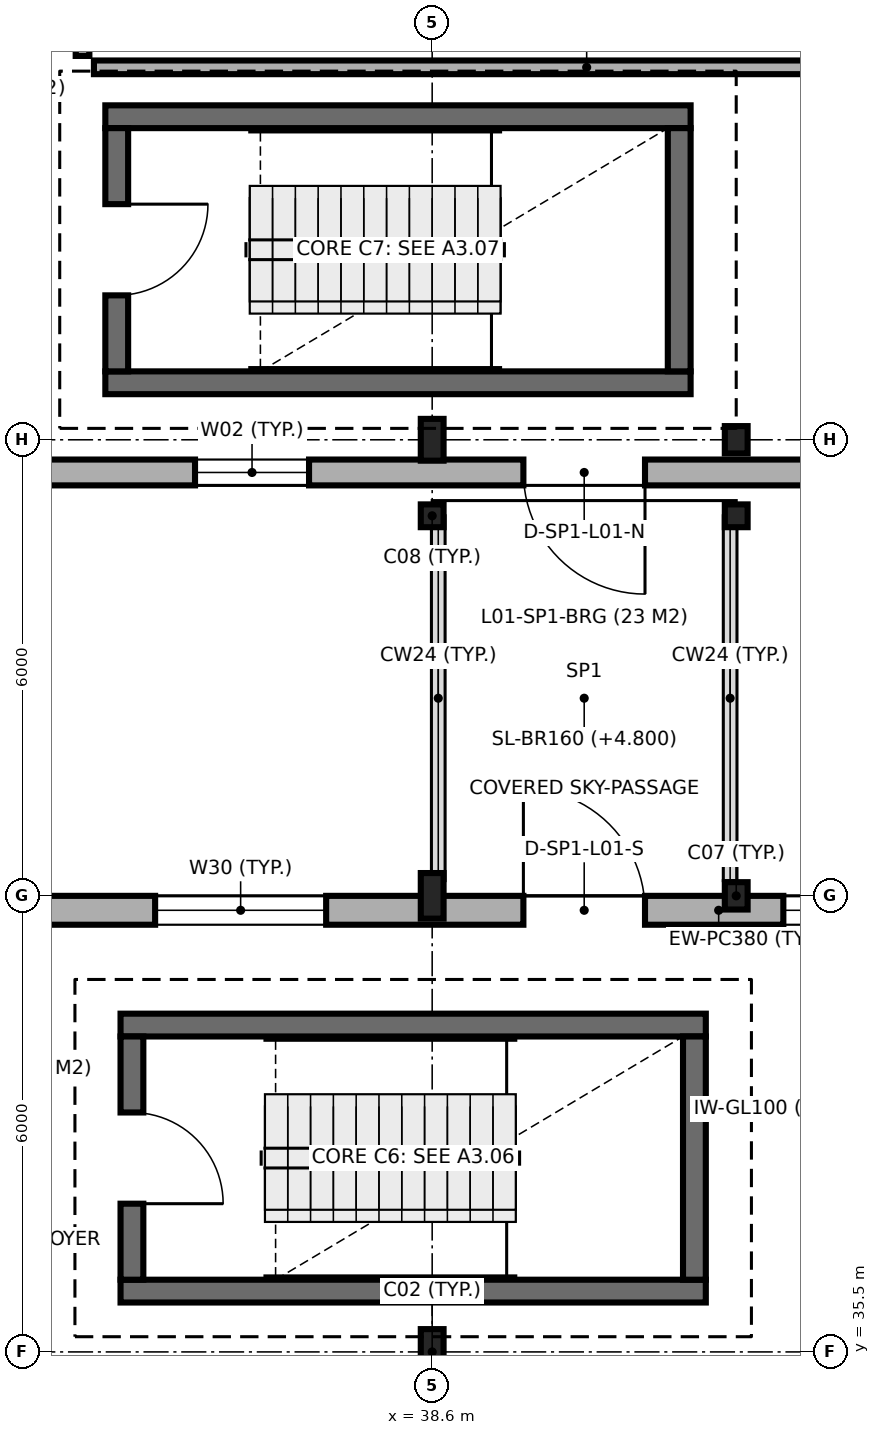
"""IFC4 building model, lengths in metres.
Left out: names, types, materials, properties, quantities, classifications, styles, units other than length and angle.
Written with IfcOpenShell. Run it as: python <this file> out.ifc"""

import sys

from ifc_helpers import new_model, si_unit, direction, frame, frame_2d, origin, origin_2d, place, context, subcontext, project, spatial, rectangle, i_section, extrude, element, fill, save


model = new_model("IFC4")
c1 = context("Model", 3, precision=1e-05, world=origin(), true_north=direction((0.0, 1.0)))
c2 = subcontext(c1, "Body", "Model", "MODEL_VIEW")
j1 = project(units=[si_unit("LENGTHUNIT", "METRE"), si_unit("PLANEANGLEUNIT", "RADIAN")], contexts=[c1])
p1 = place(None, origin())
s1 = spatial("IfcSite", under=j1, at=p1, CompositionType="ELEMENT")
p2 = place(p1, origin())
s2 = spatial("IfcBuilding", under=s1, at=p2, CompositionType="ELEMENT")
p3 = place(p2, frame((0.0, 0.0, 4.8)))
s3 = spatial("IfcBuildingStorey", under=s2, at=p3, CompositionType="ELEMENT", Elevation=4.8)
for number, where, z_axis, x_axis in (
    (1, (38.6, 35.5, 0.0), (0.0, 0.0, 1.0), (1.0, 0.0, 0.0)),
    (2, (38.6, 41.5, 0.0), (0.0, 0.0, 1.0), (1.0, 0.0, 0.0)),
):
    element("IfcColumn", number, at=place(p3, frame(where, z_axis=z_axis, x_axis=x_axis)), inside=s3, PredefinedType="COLUMN", context=c2, shape_type="SweptSolid", body=[
        extrude(i_section(OverallWidth=0.3, OverallDepth=0.6, WebThickness=0.015, FlangeThickness=0.03, FilletRadius=0.027, at=origin_2d()), origin(), (0.0, 0.0, 1.0), 4.5),
    ])
p4 = place(p3, frame((38.6, 46.5, 0.0), z_axis=(0.0, 0.0, 1.0), x_axis=(1.0, 0.0, 0.0)))
e3 = element("IfcColumn", 3, at=p4, inside=s3, PredefinedType="COLUMN", context=c2, shape_type="SweptSolid", body=[
    extrude(i_section(OverallWidth=0.3, OverallDepth=0.3, WebThickness=0.011, FlangeThickness=0.019, FilletRadius=0.027, at=origin_2d()), origin(), (0.0, 0.0, 1.0), 4.5),
])
p5 = place(p3, frame((38.6, 47.5, 0.0), z_axis=(0.0, 0.0, 1.0), x_axis=(1.0, 0.0, 0.0)))
e4 = element("IfcColumn", 4, at=p5, inside=s3, PredefinedType="COLUMN", context=c2, shape_type="SweptSolid", body=[
    extrude(i_section(OverallWidth=0.3, OverallDepth=0.55, WebThickness=0.015, FlangeThickness=0.029, FilletRadius=0.027, at=origin_2d()), origin(), (0.0, 0.0, 1.0), 4.5),
])
p6 = place(p3, frame((42.6, 41.5, 0.0), z_axis=(0.0, 0.0, 1.0), x_axis=(1.0, 0.0, 0.0)))
e5 = element("IfcColumn", 5, at=p6, inside=s3, PredefinedType="COLUMN", context=c2, shape_type="SweptSolid", body=[
    extrude(i_section(OverallWidth=0.3, OverallDepth=0.36, WebThickness=0.012, FlangeThickness=0.022, FilletRadius=0.027, at=origin_2d()), origin(), (0.0, 0.0, 1.0), 4.5),
])
p7 = place(p3, frame((42.6, 46.5, 0.0), z_axis=(0.0, 0.0, 1.0), x_axis=(1.0, 0.0, 0.0)))
e6 = element("IfcColumn", 6, at=p7, inside=s3, PredefinedType="COLUMN", context=c2, shape_type="SweptSolid", body=[
    extrude(i_section(OverallWidth=0.3, OverallDepth=0.3, WebThickness=0.011, FlangeThickness=0.019, FilletRadius=0.027, at=origin_2d()), origin(), (0.0, 0.0, 1.0), 4.5),
])
p8 = place(p3, frame((42.6, 47.5, 0.0), z_axis=(0.0, 0.0, 1.0), x_axis=(1.0, 0.0, 0.0)))
e7 = element("IfcColumn", 7, at=p8, inside=s3, PredefinedType="COLUMN", context=c2, shape_type="SweptSolid", body=[
    extrude(i_section(OverallWidth=0.3, OverallDepth=0.36, WebThickness=0.012, FlangeThickness=0.022, FilletRadius=0.027, at=origin_2d()), origin(), (0.0, 0.0, 1.0), 4.5),
])
for number, where, z_axis, x_axis in (
    (8, (34.5, 36.3, 0.0), (0.0, 0.0, 1.0), (1.0, 0.0, 0.0)),
    (9, (42.2, 39.8, 0.0), (0.0, 0.0, 1.0), (-1.0, 0.0, 0.0)),
):
    element("IfcWall", number, at=place(p3, frame(where, z_axis=z_axis, x_axis=x_axis)), inside=s3, PredefinedType="SHEAR", context=c2, shape_type="SweptSolid", body=[
        extrude(rectangle(XDim=7.7, YDim=0.3, at=frame_2d((3.85, 0.0))), origin(), (0.0, 0.0, 1.0), 4.5),
    ])
p9 = place(p3, frame((34.65, 39.65, 0.0), z_axis=(0.0, 0.0, 1.0), x_axis=(0.0, -1.0, 0.0)))
e10 = element("IfcWall", 10, at=p9, inside=s3, PredefinedType="SHEAR", context=c2, shape_type="SweptSolid", body=[
    extrude(rectangle(XDim=3.2, YDim=0.3, at=frame_2d((1.6, 0.0))), origin(), (0.0, 0.0, 1.0), 4.5),
])
p10 = place(p9, frame((1.0, 0.0, 0.0)))
e11 = element("IfcOpeningElement", 11, at=p10, cuts=e10, PredefinedType="OPENING", context=c2, shape_type="SweptSolid", body=[
    extrude(rectangle(XDim=1.2, YDim=2.15, at=frame_2d((0.6, 1.075))), frame((0.0, 0.16, 0.0), z_axis=(0.0, -1.0, 0.0), x_axis=(1.0, 0.0, 0.0)), (0.0, 0.0, 1.0), 0.32),
])
p11 = place(p3, frame((42.05, 36.45, 0.0), z_axis=(0.0, 0.0, 1.0), x_axis=(0.0, 1.0, 0.0)))
e12 = element("IfcWall", 12, at=p11, inside=s3, PredefinedType="SHEAR", context=c2, shape_type="SweptSolid", body=[
    extrude(rectangle(XDim=3.2, YDim=0.3, at=frame_2d((1.6, 0.0))), origin(), (0.0, 0.0, 1.0), 4.5),
])
for number, where, z_axis, x_axis in (
    (13, (34.3, 48.25, 0.0), (0.0, 0.0, 1.0), (1.0, 0.0, 0.0)),
    (14, (42.0, 51.75, 0.0), (0.0, 0.0, 1.0), (-1.0, 0.0, 0.0)),
):
    element("IfcWall", number, at=place(p3, frame(where, z_axis=z_axis, x_axis=x_axis)), inside=s3, PredefinedType="SHEAR", context=c2, shape_type="SweptSolid", body=[
        extrude(rectangle(XDim=7.7, YDim=0.3, at=frame_2d((3.85, 0.0))), origin(), (0.0, 0.0, 1.0), 4.5),
    ])
p12 = place(p3, frame((34.45, 51.6, 0.0), z_axis=(0.0, 0.0, 1.0), x_axis=(0.0, -1.0, 0.0)))
e15 = element("IfcWall", 15, at=p12, inside=s3, PredefinedType="SHEAR", context=c2, shape_type="SweptSolid", body=[
    extrude(rectangle(XDim=3.2, YDim=0.3, at=frame_2d((1.6, 0.0))), origin(), (0.0, 0.0, 1.0), 4.5),
])
p13 = place(p12, frame((1.0, 0.0, 0.0)))
e16 = element("IfcOpeningElement", 16, at=p13, cuts=e15, PredefinedType="OPENING", context=c2, shape_type="SweptSolid", body=[
    extrude(rectangle(XDim=1.2, YDim=2.15, at=frame_2d((0.6, 1.075))), frame((0.0, 0.16, 0.0), z_axis=(0.0, -1.0, 0.0), x_axis=(1.0, 0.0, 0.0)), (0.0, 0.0, 1.0), 0.32),
])
p14 = place(p3, frame((41.85, 48.4, 0.0), z_axis=(0.0, 0.0, 1.0), x_axis=(0.0, 1.0, 0.0)))
e17 = element("IfcWall", 17, at=p14, inside=s3, PredefinedType="SHEAR", context=c2, shape_type="SweptSolid", body=[
    extrude(rectangle(XDim=3.2, YDim=0.3, at=frame_2d((1.6, 0.0))), origin(), (0.0, 0.0, 1.0), 4.5),
])
p15 = place(p3, frame((54.138, 41.31, 0.0), z_axis=(0.0, 0.0, 1.0), x_axis=(-1.0, 0.0, 0.0)))
e18 = element("IfcWall", 18, at=p15, inside=s3, PredefinedType="SOLIDWALL", context=c2, shape_type="SweptSolid", body=[
    extrude(rectangle(XDim=23.538, YDim=0.38, at=frame_2d((11.769, 0.0))), origin(), (0.0, 0.0, 1.0), 4.25),
])
p16 = place(p15, frame((12.738, 0.0, 0.0)))
e19 = element("IfcOpeningElement", 19, at=p16, cuts=e18, PredefinedType="OPENING", context=c2, shape_type="SweptSolid", body=[
    extrude(rectangle(XDim=1.6, YDim=2.2, at=frame_2d((0.8, 1.1))), frame((0.0, 0.2, 0.0), z_axis=(0.0, -1.0, 0.0), x_axis=(1.0, 0.0, 0.0)), (0.0, 0.0, 1.0), 0.4),
])
p17 = place(p15, frame((4.088, 0.0, 0.9)))
e20 = element("IfcOpeningElement", 20, at=p17, cuts=e18, PredefinedType="OPENING", context=c2, shape_type="SweptSolid", body=[
    extrude(rectangle(XDim=0.9, YDim=1.8, at=frame_2d((0.45, 0.9))), frame((0.0, 0.2, 0.0), z_axis=(0.0, -1.0, 0.0), x_axis=(1.0, 0.0, 0.0)), (0.0, 0.0, 1.0), 0.4),
])
p18 = place(p15, frame((8.258, 0.0, 0.9)))
e21 = element("IfcOpeningElement", 21, at=p18, cuts=e18, PredefinedType="OPENING", context=c2, shape_type="SweptSolid", body=[
    extrude(rectangle(XDim=0.9, YDim=1.8, at=frame_2d((0.45, 0.9))), frame((0.0, 0.2, 0.0), z_axis=(0.0, -1.0, 0.0), x_axis=(1.0, 0.0, 0.0)), (0.0, 0.0, 1.0), 0.4),
])
p19 = place(p15, frame((10.018, 0.0, 0.9)))
e22 = element("IfcOpeningElement", 22, at=p19, cuts=e18, PredefinedType="OPENING", context=c2, shape_type="SweptSolid", body=[
    extrude(rectangle(XDim=0.9, YDim=1.8, at=frame_2d((0.45, 0.9))), frame((0.0, 0.2, 0.0), z_axis=(0.0, -1.0, 0.0), x_axis=(1.0, 0.0, 0.0)), (0.0, 0.0, 1.0), 0.4),
])
p20 = place(p15, frame((16.933, 0.0, 0.9)))
e23 = element("IfcOpeningElement", 23, at=p20, cuts=e18, PredefinedType="OPENING", context=c2, shape_type="SweptSolid", body=[
    extrude(rectangle(XDim=2.25, YDim=1.95, at=frame_2d((1.125, 0.975))), frame((0.0, 0.2, 0.0), z_axis=(0.0, -1.0, 0.0), x_axis=(1.0, 0.0, 0.0)), (0.0, 0.0, 1.0), 0.4),
])
p21 = place(p3, frame((5.922, 47.07, 0.0), z_axis=(0.0, 0.0, 1.0), x_axis=(1.0, 0.0, 0.0)))
e24 = element("IfcWall", 24, at=p21, inside=s3, PredefinedType="SOLIDWALL", context=c2, shape_type="SweptSolid", body=[
    extrude(rectangle(XDim=41.478, YDim=0.34, at=frame_2d((20.739, 0.0))), origin(), (0.0, 0.0, 1.0), 4.25),
])
p22 = place(p21, frame((33.878, 0.0, 0.0)))
e25 = element("IfcOpeningElement", 25, at=p22, cuts=e24, PredefinedType="OPENING", context=c2, shape_type="SweptSolid", body=[
    extrude(rectangle(XDim=1.6, YDim=2.2, at=frame_2d((0.8, 1.1))), frame((0.0, 0.18, 0.0), z_axis=(0.0, -1.0, 0.0), x_axis=(1.0, 0.0, 0.0)), (0.0, 0.0, 1.0), 0.36),
])
p23 = place(p21, frame((3.243, 0.0, 0.9)))
e26 = element("IfcOpeningElement", 26, at=p23, cuts=e24, PredefinedType="OPENING", context=c2, shape_type="SweptSolid", body=[
    extrude(rectangle(XDim=2.85, YDim=1.95, at=frame_2d((1.425, 0.975))), frame((0.0, 0.18, 0.0), z_axis=(0.0, -1.0, 0.0), x_axis=(1.0, 0.0, 0.0)), (0.0, 0.0, 1.0), 0.36),
])
p24 = place(p21, frame((25.408, 0.0, 0.9)))
e27 = element("IfcOpeningElement", 27, at=p24, cuts=e24, PredefinedType="OPENING", context=c2, shape_type="SweptSolid", body=[
    extrude(rectangle(XDim=2.2, YDim=1.65, at=frame_2d((1.1, 0.825))), frame((0.0, 0.18, 0.0), z_axis=(0.0, -1.0, 0.0), x_axis=(1.0, 0.0, 0.0)), (0.0, 0.0, 1.0), 0.36),
])
p25 = place(p21, frame((29.558, 0.0, 0.9)))
e28 = element("IfcOpeningElement", 28, at=p25, cuts=e24, PredefinedType="OPENING", context=c2, shape_type="SweptSolid", body=[
    extrude(rectangle(XDim=1.5, YDim=1.8, at=frame_2d((0.75, 0.9))), frame((0.0, 0.18, 0.0), z_axis=(0.0, -1.0, 0.0), x_axis=(1.0, 0.0, 0.0)), (0.0, 0.0, 1.0), 0.36),
])
p26 = place(p21, frame((37.628, 0.0, 0.9)))
e29 = element("IfcOpeningElement", 29, at=p26, cuts=e24, PredefinedType="OPENING", context=c2, shape_type="SweptSolid", body=[
    extrude(rectangle(XDim=2.1, YDim=1.8, at=frame_2d((1.05, 0.9))), frame((0.0, 0.18, 0.0), z_axis=(0.0, -1.0, 0.0), x_axis=(1.0, 0.0, 0.0)), (0.0, 0.0, 1.0), 0.36),
])
p27 = place(p3, frame((34.15, 52.4, 0.0), z_axis=(0.0, 0.0, 1.0), x_axis=(1.0, 0.0, 0.0)))
e30 = element("IfcWall", 30, at=p27, inside=s3, PredefinedType="PARTITIONING", context=c2, shape_type="SweptSolid", body=[
    extrude(rectangle(XDim=12.965, YDim=0.18, at=frame_2d((6.482, 0.0))), origin(), (0.0, 0.0, 1.0), 4.25),
])
p28 = place(p3, frame((34.0, 52.55, 0.0), z_axis=(0.0, 0.0, 1.0), x_axis=(0.0, 1.0, 0.0)))
e31 = element("IfcWall", 31, at=p28, inside=s3, PredefinedType="PARTITIONING", context=c2, shape_type="SweptSolid", body=[
    extrude(rectangle(XDim=4.77, YDim=0.18, at=frame_2d((2.385, 0.0))), origin(), (0.0, 0.0, 1.0), 4.25),
])
p29 = place(p28, frame((1.652, 0.0, 0.0)))
e32 = element("IfcOpeningElement", 32, at=p29, cuts=e31, PredefinedType="OPENING", context=c2, shape_type="SweptSolid", body=[
    extrude(rectangle(XDim=1.1, YDim=2.15, at=frame_2d((0.55, 1.075))), frame((0.0, 0.1, 0.0), z_axis=(0.0, -1.0, 0.0), x_axis=(1.0, 0.0, 0.0)), (0.0, 0.0, 1.0), 0.2),
])
p30 = place(p10, origin())
e33 = element("IfcDoor", 33, at=p30, inside=s3, OperationType="SINGLE_SWING_RIGHT", PredefinedType="DOOR", context=c2, shape_type="SweptSolid", body=[
    extrude(rectangle(XDim=1.2, YDim=2.15, at=frame_2d((0.6, 1.075))), frame((0.0, 0.025, 0.0), z_axis=(0.0, -1.0, 0.0), x_axis=(1.0, 0.0, 0.0)), (0.0, 0.0, 1.0), 0.05),
])
fill(e11, e33)
p31 = place(p13, origin())
e34 = element("IfcDoor", 34, at=p31, inside=s3, OperationType="SINGLE_SWING_LEFT", PredefinedType="DOOR", context=c2, shape_type="SweptSolid", body=[
    extrude(rectangle(XDim=1.2, YDim=2.15, at=frame_2d((0.6, 1.075))), frame((0.0, 0.025, 0.0), z_axis=(0.0, -1.0, 0.0), x_axis=(1.0, 0.0, 0.0)), (0.0, 0.0, 1.0), 0.05),
])
fill(e16, e34)
p32 = place(p16, frame((1.6, 0.0, 0.0), z_axis=(0.0, 0.0, 1.0), x_axis=(-1.0, 0.0, 0.0)))
e35 = element("IfcDoor", 35, at=p32, inside=s3, OperationType="SINGLE_SWING_RIGHT", PredefinedType="DOOR", context=c2, shape_type="SweptSolid", body=[
    extrude(rectangle(XDim=1.6, YDim=2.2, at=frame_2d((0.8, 1.1))), frame((0.0, 0.025, 0.0), z_axis=(0.0, -1.0, 0.0), x_axis=(1.0, 0.0, 0.0)), (0.0, 0.0, 1.0), 0.05),
])
fill(e19, e35)
p33 = place(p19, origin())
e36 = element("IfcWindow", 36, at=p33, inside=s3, PartitioningType="SINGLE_PANEL", PredefinedType="WINDOW", context=c2, shape_type="SweptSolid", body=[
    extrude(rectangle(XDim=0.9, YDim=1.8, at=frame_2d((0.45, 0.9))), frame((0.0, 0.03, 0.0), z_axis=(0.0, -1.0, 0.0), x_axis=(1.0, 0.0, 0.0)), (0.0, 0.0, 1.0), 0.06),
])
fill(e22, e36)
p34 = place(p20, origin())
e37 = element("IfcWindow", 37, at=p34, inside=s3, PartitioningType="SINGLE_PANEL", PredefinedType="WINDOW", context=c2, shape_type="SweptSolid", body=[
    extrude(rectangle(XDim=2.25, YDim=1.95, at=frame_2d((1.125, 0.975))), frame((0.0, 0.03, 0.0), z_axis=(0.0, -1.0, 0.0), x_axis=(1.0, 0.0, 0.0)), (0.0, 0.0, 1.0), 0.06),
])
fill(e23, e37)
p35 = place(p22, frame((1.6, 0.0, 0.0), z_axis=(0.0, 0.0, 1.0), x_axis=(-1.0, 0.0, 0.0)))
e38 = element("IfcDoor", 38, at=p35, inside=s3, OperationType="SINGLE_SWING_RIGHT", PredefinedType="DOOR", context=c2, shape_type="SweptSolid", body=[
    extrude(rectangle(XDim=1.6, YDim=2.2, at=frame_2d((0.8, 1.1))), frame((0.0, 0.025, 0.0), z_axis=(0.0, -1.0, 0.0), x_axis=(1.0, 0.0, 0.0)), (0.0, 0.0, 1.0), 0.05),
])
fill(e25, e38)
p36 = place(p25, origin())
e39 = element("IfcWindow", 39, at=p36, inside=s3, PartitioningType="SINGLE_PANEL", PredefinedType="WINDOW", context=c2, shape_type="SweptSolid", body=[
    extrude(rectangle(XDim=1.5, YDim=1.8, at=frame_2d((0.75, 0.9))), frame((0.0, 0.03, 0.0), z_axis=(0.0, -1.0, 0.0), x_axis=(1.0, 0.0, 0.0)), (0.0, 0.0, 1.0), 0.06),
])
fill(e28, e39)
save(model, sys.argv[1])
